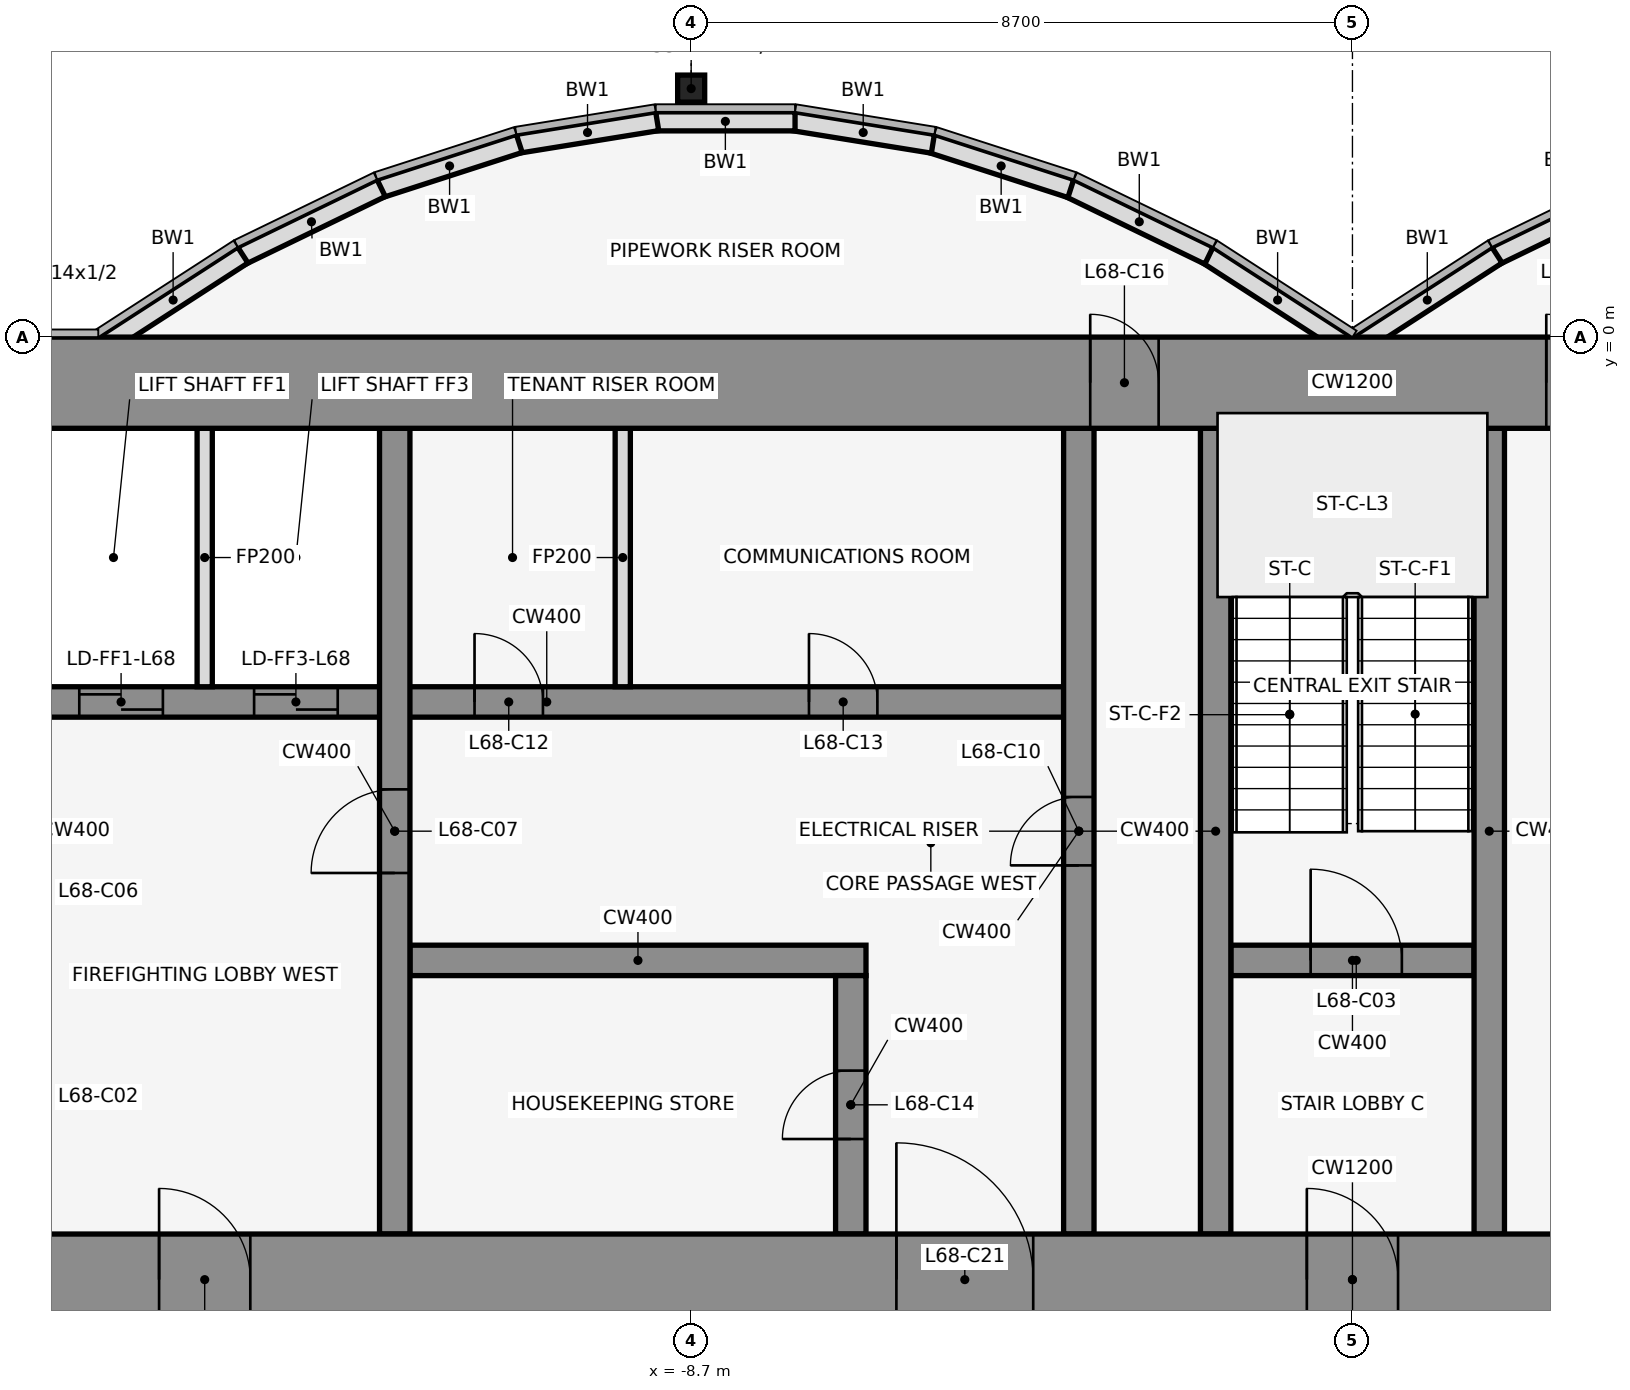
"""IFC4 building model, lengths in metres.
Left out: names, types, materials, properties, quantities, classifications, styles, units other than length and angle.
Written with IfcOpenShell. Run it as: python <this file> out.ifc"""

import sys

from ifc_helpers import new_model, si_unit, direction, frame, frame_2d, origin, origin_2d, place, context, subcontext, project, spatial, rectangle, hollow_rectangle, extrude, element, fill, save


model = new_model("IFC4")
c1 = context("Model", 3, precision=1e-05, world=origin(), true_north=direction((0.0, 1.0)))
c2 = subcontext(c1, "Body", "Model", "MODEL_VIEW")
j1 = project(units=[si_unit("LENGTHUNIT", "METRE"), si_unit("PLANEANGLEUNIT", "RADIAN")], contexts=[c1])
p1 = place(None, origin())
s1 = spatial("IfcSite", under=j1, at=p1, CompositionType="ELEMENT")
p2 = place(p1, origin())
s2 = spatial("IfcBuilding", under=s1, at=p2, CompositionType="ELEMENT")
p3 = place(p2, frame((0.0, 0.0, 302.0)))
s3 = spatial("IfcBuildingStorey", under=s2, at=p3, CompositionType="ELEMENT", Elevation=302.0)
p4 = place(p3, frame((-8.7, 3.269, 0.0), z_axis=(0.0, 0.0, 1.0), x_axis=(1.0, 0.0, 0.0)))
e1 = element("IfcColumn", 1, at=p4, inside=s3, PredefinedType="COLUMN", context=c2, shape_type="SweptSolid", body=[
    extrude(hollow_rectangle(XDim=0.356, YDim=0.356, WallThickness=0.012, at=origin_2d()), origin(), (0.0, 0.0, 1.0), 4.5),
])
p5 = place(p3, frame((3.721, 1.962, 0.0), z_axis=(0.0, 0.0, 1.0), x_axis=(-0.89982408427, -0.436252928206, 0.0)))
e2 = element("IfcWall", 2, at=p5, inside=s3, PredefinedType="STANDARD", context=c2, shape_type="SweptSolid", body=[
    extrude(rectangle(XDim=2.038, YDim=0.25, at=frame_2d((1.019, 0.0))), origin(), (0.0, 0.0, 1.0), 4.35),
])
for number, where, z_axis, x_axis in (
    (3, (1.901, 1.08, 0.0), (0.0, 0.0, 1.0), (-0.84, -0.543, 0.0)),
    (4, (-0.068, -0.105, 0.0), (0.0, 0.0, 1.0), (-0.84, 0.543, 0.0)),
):
    element("IfcWall", number, at=place(p3, frame(where, z_axis=z_axis, x_axis=x_axis)), inside=s3, PredefinedType="STANDARD", context=c2, shape_type="SweptSolid", body=[
        extrude(rectangle(XDim=2.183, YDim=0.25, at=frame_2d((1.091, 0.0))), origin(), (0.0, 0.0, 1.0), 4.35),
    ])
p6 = place(p3, frame((-1.888, 1.073, 0.0), z_axis=(0.0, 0.0, 1.0), x_axis=(-0.89982408427, 0.436252928206, 0.0)))
e5 = element("IfcWall", 5, at=p6, inside=s3, PredefinedType="STANDARD", context=c2, shape_type="SweptSolid", body=[
    extrude(rectangle(XDim=2.038, YDim=0.25, at=frame_2d((1.019, 0.0))), origin(), (0.0, 0.0, 1.0), 4.35),
])
p7 = place(p3, frame((-3.705, 1.955, 0.0), z_axis=(0.0, 0.0, 1.0), x_axis=(-0.951495806175, 0.307661714928, 0.0)))
e6 = element("IfcWall", 6, at=p7, inside=s3, PredefinedType="STANDARD", context=c2, shape_type="SweptSolid", body=[
    extrude(rectangle(XDim=1.927, YDim=0.25, at=frame_2d((0.963, 0.0))), origin(), (0.0, 0.0, 1.0), 4.35),
])
p8 = place(p3, frame((-5.52, 2.543, 0.0), z_axis=(0.0, 0.0, 1.0), x_axis=(-0.987181718931, 0.159600293885, 0.0)))
e7 = element("IfcWall", 7, at=p8, inside=s3, PredefinedType="STANDARD", context=c2, shape_type="SweptSolid", body=[
    extrude(rectangle(XDim=1.857, YDim=0.25, at=frame_2d((0.929, 0.0))), origin(), (0.0, 0.0, 1.0), 4.35),
])
p9 = place(p3, frame((-7.333, 2.838, 0.0), z_axis=(0.0, 0.0, 1.0), x_axis=(-1.0, 0.0, 0.0)))
e8 = element("IfcWall", 8, at=p9, inside=s3, PredefinedType="STANDARD", context=c2, shape_type="SweptSolid", body=[
    extrude(rectangle(XDim=1.833, YDim=0.25, at=frame_2d((0.917, 0.0))), origin(), (0.0, 0.0, 1.0), 4.35),
])
p10 = place(p3, frame((-9.147, 2.84, 0.0), z_axis=(0.0, 0.0, 1.0), x_axis=(-0.987181718931, -0.159600293885, 0.0)))
e9 = element("IfcWall", 9, at=p10, inside=s3, PredefinedType="STANDARD", context=c2, shape_type="SweptSolid", body=[
    extrude(rectangle(XDim=1.857, YDim=0.25, at=frame_2d((0.929, 0.0))), origin(), (0.0, 0.0, 1.0), 4.35),
])
p11 = place(p3, frame((-10.962, 2.548, 0.0), z_axis=(0.0, 0.0, 1.0), x_axis=(-0.951495806175, -0.307661714928, 0.0)))
e10 = element("IfcWall", 10, at=p11, inside=s3, PredefinedType="STANDARD", context=c2, shape_type="SweptSolid", body=[
    extrude(rectangle(XDim=1.927, YDim=0.25, at=frame_2d((0.963, 0.0))), origin(), (0.0, 0.0, 1.0), 4.35),
])
p12 = place(p3, frame((-12.779, 1.962, 0.0), z_axis=(0.0, 0.0, 1.0), x_axis=(-0.89982408427, -0.436252928206, 0.0)))
e11 = element("IfcWall", 11, at=p12, inside=s3, PredefinedType="STANDARD", context=c2, shape_type="SweptSolid", body=[
    extrude(rectangle(XDim=2.038, YDim=0.25, at=frame_2d((1.019, 0.0))), origin(), (0.0, 0.0, 1.0), 4.35),
])
p13 = place(p3, frame((-14.599, 1.08, 0.0), z_axis=(0.0, 0.0, 1.0), x_axis=(-0.83981312244, -0.542875602121, 0.0)))
e12 = element("IfcWall", 12, at=p13, inside=s3, PredefinedType="STANDARD", context=c2, shape_type="SweptSolid", body=[
    extrude(rectangle(XDim=2.183, YDim=0.25, at=frame_2d((1.091, 0.0))), origin(), (0.0, 0.0, 1.0), 4.35),
])
p14 = place(p3, frame((-12.4, -8.2, 0.0), z_axis=(0.0, 0.0, 1.0), x_axis=(1.0, 0.0, 0.0)))
e13 = element("IfcWall", 13, at=p14, inside=s3, PredefinedType="SHEAR", context=c2, shape_type="SweptSolid", body=[
    extrude(rectangle(XDim=6.0, YDim=0.4, at=frame_2d((3.0, 0.0))), origin(), (0.0, 0.0, 1.0), 4.5),
])
p15 = place(p3, frame((-1.6, -8.2, 0.0), z_axis=(0.0, 0.0, 1.0), x_axis=(1.0, 0.0, 0.0)))
e14 = element("IfcWall", 14, at=p15, inside=s3, PredefinedType="SHEAR", context=c2, shape_type="SweptSolid", body=[
    extrude(rectangle(XDim=3.2, YDim=0.4, at=frame_2d((1.6, 0.0))), origin(), (0.0, 0.0, 1.0), 4.5),
])
p16 = place(p15, frame((1.05, 0.0, 0.0)))
e15 = element("IfcOpeningElement", 15, at=p16, cuts=e14, PredefinedType="OPENING", context=c2, shape_type="SweptSolid", body=[
    extrude(rectangle(XDim=1.2, YDim=2.1, at=frame_2d((0.6, 1.05))), frame((0.0, 0.212, 0.0), z_axis=(0.0, -1.0, 0.0), x_axis=(1.0, 0.0, 0.0)), (0.0, 0.0, 1.0), 0.424),
])
p17 = place(p3, frame((-17.4, -4.8, 0.0), z_axis=(0.0, 0.0, 1.0), x_axis=(1.0, 0.0, 0.0)))
e16 = element("IfcWall", 16, at=p17, inside=s3, PredefinedType="SHEAR", context=c2, shape_type="SweptSolid", body=[
    extrude(rectangle(XDim=13.6, YDim=0.4, at=frame_2d((6.8, 0.0))), origin(), (0.0, 0.0, 1.0), 4.5),
])
p18 = place(p17, frame((0.65, 0.0, 0.0)))
e17 = element("IfcOpeningElement", 17, at=p18, cuts=e16, PredefinedType="OPENING", context=c2, shape_type="SweptSolid", body=[
    extrude(rectangle(XDim=1.1, YDim=2.1, at=frame_2d((0.55, 1.05))), frame((0.0, 0.212, 0.0), z_axis=(0.0, -1.0, 0.0), x_axis=(1.0, 0.0, 0.0)), (0.0, 0.0, 1.0), 0.424),
])
p19 = place(p17, frame((2.95, 0.0, 0.0)))
e18 = element("IfcOpeningElement", 18, at=p19, cuts=e16, PredefinedType="OPENING", context=c2, shape_type="SweptSolid", body=[
    extrude(rectangle(XDim=1.1, YDim=2.1, at=frame_2d((0.55, 1.05))), frame((0.0, 0.212, 0.0), z_axis=(0.0, -1.0, 0.0), x_axis=(1.0, 0.0, 0.0)), (0.0, 0.0, 1.0), 0.424),
])
p20 = place(p17, frame((5.85, 0.0, 0.0)))
e19 = element("IfcOpeningElement", 19, at=p20, cuts=e16, PredefinedType="OPENING", context=c2, shape_type="SweptSolid", body=[
    extrude(rectangle(XDim=0.9, YDim=2.1, at=frame_2d((0.45, 1.05))), frame((0.0, 0.212, 0.0), z_axis=(0.0, -1.0, 0.0), x_axis=(1.0, 0.0, 0.0)), (0.0, 0.0, 1.0), 0.424),
])
p21 = place(p17, frame((10.25, 0.0, 0.0)))
e20 = element("IfcOpeningElement", 20, at=p21, cuts=e16, PredefinedType="OPENING", context=c2, shape_type="SweptSolid", body=[
    extrude(rectangle(XDim=0.9, YDim=2.1, at=frame_2d((0.45, 1.05))), frame((0.0, 0.212, 0.0), z_axis=(0.0, -1.0, 0.0), x_axis=(1.0, 0.0, 0.0)), (0.0, 0.0, 1.0), 0.424),
])
p22 = place(p3, frame((-15.1, -4.6, 0.0), z_axis=(0.0, 0.0, 1.0), x_axis=(0.0, 1.0, 0.0)))
e21 = element("IfcWall", 21, at=p22, inside=s3, PredefinedType="PARTITIONING", context=c2, shape_type="SweptSolid", body=[
    extrude(rectangle(XDim=3.4, YDim=0.2, at=frame_2d((1.7, 0.0))), origin(), (0.0, 0.0, 1.0), 3.418),
])
p23 = place(p3, frame((-12.6, -11.8, 0.0), z_axis=(0.0, 0.0, 1.0), x_axis=(0.0, 1.0, 0.0)))
e22 = element("IfcWall", 22, at=p23, inside=s3, PredefinedType="SHEAR", context=c2, shape_type="SweptSolid", body=[
    extrude(rectangle(XDim=10.6, YDim=0.4, at=frame_2d((5.3, 0.0))), origin(), (0.0, 0.0, 1.0), 4.5),
])
p24 = place(p23, frame((4.75, 0.0, 0.0)))
e23 = element("IfcOpeningElement", 23, at=p24, cuts=e22, PredefinedType="OPENING", context=c2, shape_type="SweptSolid", body=[
    extrude(rectangle(XDim=1.1, YDim=2.1, at=frame_2d((0.55, 1.05))), frame((0.0, 0.212, 0.0), z_axis=(0.0, -1.0, 0.0), x_axis=(1.0, 0.0, 0.0)), (0.0, 0.0, 1.0), 0.424),
])
p25 = place(p3, frame((-9.6, -4.6, 0.0), z_axis=(0.0, 0.0, 1.0), x_axis=(0.0, 1.0, 0.0)))
e24 = element("IfcWall", 24, at=p25, inside=s3, PredefinedType="PARTITIONING", context=c2, shape_type="SweptSolid", body=[
    extrude(rectangle(XDim=3.4, YDim=0.2, at=frame_2d((1.7, 0.0))), origin(), (0.0, 0.0, 1.0), 3.418),
])
p26 = place(p3, frame((-6.6, -11.8, 0.0), z_axis=(0.0, 0.0, 1.0), x_axis=(0.0, 1.0, 0.0)))
e25 = element("IfcWall", 25, at=p26, inside=s3, PredefinedType="SHEAR", context=c2, shape_type="SweptSolid", body=[
    extrude(rectangle(XDim=3.4, YDim=0.4, at=frame_2d((1.7, 0.0))), origin(), (0.0, 0.0, 1.0), 4.5),
])
p27 = place(p26, frame((1.25, 0.0, 0.0)))
e26 = element("IfcOpeningElement", 26, at=p27, cuts=e25, PredefinedType="OPENING", context=c2, shape_type="SweptSolid", body=[
    extrude(rectangle(XDim=0.9, YDim=2.1, at=frame_2d((0.45, 1.05))), frame((0.0, 0.212, 0.0), z_axis=(0.0, -1.0, 0.0), x_axis=(1.0, 0.0, 0.0)), (0.0, 0.0, 1.0), 0.424),
])
p28 = place(p3, frame((-3.6, -11.8, 0.0), z_axis=(0.0, 0.0, 1.0), x_axis=(0.0, 1.0, 0.0)))
e27 = element("IfcWall", 27, at=p28, inside=s3, PredefinedType="SHEAR", context=c2, shape_type="SweptSolid", body=[
    extrude(rectangle(XDim=10.6, YDim=0.4, at=frame_2d((5.3, 0.0))), origin(), (0.0, 0.0, 1.0), 4.5),
])
p29 = place(p28, frame((4.85, 0.0, 0.0)))
e28 = element("IfcOpeningElement", 28, at=p29, cuts=e27, PredefinedType="OPENING", context=c2, shape_type="SweptSolid", body=[
    extrude(rectangle(XDim=0.9, YDim=2.1, at=frame_2d((0.45, 1.05))), frame((0.0, 0.212, 0.0), z_axis=(0.0, -1.0, 0.0), x_axis=(1.0, 0.0, 0.0)), (0.0, 0.0, 1.0), 0.424),
])
for number, where, z_axis, x_axis in (
    (29, (-1.8, -11.8, 0.0), (0.0, 0.0, 1.0), (0.0, 1.0, 0.0)),
    (30, (1.8, -11.8, 0.0), (0.0, 0.0, 1.0), (0.0, 1.0, 0.0)),
):
    element("IfcWall", number, at=place(p3, frame(where, z_axis=z_axis, x_axis=x_axis)), inside=s3, PredefinedType="SHEAR", context=c2, shape_type="SweptSolid", body=[
        extrude(rectangle(XDim=10.6, YDim=0.4, at=frame_2d((5.3, 0.0))), origin(), (0.0, 0.0, 1.0), 4.5),
    ])
p30 = place(p3, frame((-22.0, -0.6, 0.0), z_axis=(0.0, 0.0, 1.0), x_axis=(1.0, 0.0, 0.0)))
e31 = element("IfcWall", 31, at=p30, inside=s3, PredefinedType="SHEAR", context=c2, shape_type="SweptSolid", body=[
    extrude(rectangle(XDim=44.0, YDim=1.2, at=frame_2d((22.0, 0.0))), origin(), (0.0, 0.0, 1.0), 4.5),
])
p31 = place(p30, frame((18.55, 0.0, 0.0)))
e32 = element("IfcOpeningElement", 32, at=p31, cuts=e31, PredefinedType="OPENING", context=c2, shape_type="SweptSolid", body=[
    extrude(rectangle(XDim=0.9, YDim=2.1, at=frame_2d((0.45, 1.05))), frame((0.0, 0.612, 0.0), z_axis=(0.0, -1.0, 0.0), x_axis=(1.0, 0.0, 0.0)), (0.0, 0.0, 1.0), 1.224),
])
p32 = place(p30, frame((24.55, 0.0, 0.0)))
e33 = element("IfcOpeningElement", 33, at=p32, cuts=e31, PredefinedType="OPENING", context=c2, shape_type="SweptSolid", body=[
    extrude(rectangle(XDim=0.9, YDim=2.1, at=frame_2d((0.45, 1.05))), frame((0.0, 0.612, 0.0), z_axis=(0.0, -1.0, 0.0), x_axis=(1.0, 0.0, 0.0)), (0.0, 0.0, 1.0), 1.224),
])
p33 = place(p3, frame((-22.0, -12.4, 0.0), z_axis=(0.0, 0.0, 1.0), x_axis=(1.0, 0.0, 0.0)))
e34 = element("IfcWall", 34, at=p33, inside=s3, PredefinedType="SHEAR", context=c2, shape_type="SweptSolid", body=[
    extrude(rectangle(XDim=44.0, YDim=1.2, at=frame_2d((22.0, 0.0))), origin(), (0.0, 0.0, 1.0), 4.5),
])
p34 = place(p33, frame((2.2, 0.0, 0.0)))
e35 = element("IfcOpeningElement", 35, at=p34, cuts=e34, PredefinedType="OPENING", context=c2, shape_type="SweptSolid", body=[
    extrude(rectangle(XDim=1.2, YDim=2.1, at=frame_2d((0.6, 1.05))), frame((0.0, 0.612, 0.0), z_axis=(0.0, -1.0, 0.0), x_axis=(1.0, 0.0, 0.0)), (0.0, 0.0, 1.0), 1.224),
])
p35 = place(p33, frame((21.4, 0.0, 0.0)))
e36 = element("IfcOpeningElement", 36, at=p35, cuts=e34, PredefinedType="OPENING", context=c2, shape_type="SweptSolid", body=[
    extrude(rectangle(XDim=1.2, YDim=2.1, at=frame_2d((0.6, 1.05))), frame((0.0, 0.612, 0.0), z_axis=(0.0, -1.0, 0.0), x_axis=(1.0, 0.0, 0.0)), (0.0, 0.0, 1.0), 1.224),
])
p36 = place(p33, frame((40.6, 0.0, 0.0)))
e37 = element("IfcOpeningElement", 37, at=p36, cuts=e34, PredefinedType="OPENING", context=c2, shape_type="SweptSolid", body=[
    extrude(rectangle(XDim=1.2, YDim=2.1, at=frame_2d((0.6, 1.05))), frame((0.0, 0.612, 0.0), z_axis=(0.0, -1.0, 0.0), x_axis=(1.0, 0.0, 0.0)), (0.0, 0.0, 1.0), 1.224),
])
p37 = place(p33, frame((16.0, 0.0, 0.0)))
e38 = element("IfcOpeningElement", 38, at=p37, cuts=e34, PredefinedType="OPENING", context=c2, shape_type="SweptSolid", body=[
    extrude(rectangle(XDim=1.8, YDim=2.1, at=frame_2d((0.9, 1.05))), frame((0.0, 0.612, 0.0), z_axis=(0.0, -1.0, 0.0), x_axis=(1.0, 0.0, 0.0)), (0.0, 0.0, 1.0), 1.224),
])
p38 = place(p33, frame((6.3, 0.0, 0.0)))
e39 = element("IfcOpeningElement", 39, at=p38, cuts=e34, PredefinedType="OPENING", context=c2, shape_type="SweptSolid", body=[
    extrude(rectangle(XDim=1.2, YDim=2.1, at=frame_2d((0.6, 1.05))), frame((0.0, 0.612, 0.0), z_axis=(0.0, -1.0, 0.0), x_axis=(1.0, 0.0, 0.0)), (0.0, 0.0, 1.0), 1.224),
])
p39 = place(p33, frame((26.2, 0.0, 0.0)))
e40 = element("IfcOpeningElement", 40, at=p39, cuts=e34, PredefinedType="OPENING", context=c2, shape_type="SweptSolid", body=[
    extrude(rectangle(XDim=1.8, YDim=2.1, at=frame_2d((0.9, 1.05))), frame((0.0, 0.612, 0.0), z_axis=(0.0, -1.0, 0.0), x_axis=(1.0, 0.0, 0.0)), (0.0, 0.0, 1.0), 1.224),
])
p40 = place(p33, frame((36.5, 0.0, 0.0)))
e41 = element("IfcOpeningElement", 41, at=p40, cuts=e34, PredefinedType="OPENING", context=c2, shape_type="SweptSolid", body=[
    extrude(rectangle(XDim=1.2, YDim=2.1, at=frame_2d((0.6, 1.05))), frame((0.0, 0.612, 0.0), z_axis=(0.0, -1.0, 0.0), x_axis=(1.0, 0.0, 0.0)), (0.0, 0.0, 1.0), 1.224),
])
p41 = place(p16, origin())
e42 = element("IfcDoor", 42, at=p41, inside=s3, OperationType="SINGLE_SWING_LEFT", PredefinedType="DOOR", context=c2, shape_type="SweptSolid", body=[
    extrude(rectangle(XDim=1.2, YDim=2.1, at=frame_2d((0.6, 1.05))), frame((0.0, 0.025, 0.0), z_axis=(0.0, -1.0, 0.0), x_axis=(1.0, 0.0, 0.0)), (0.0, 0.0, 1.0), 0.05),
])
fill(e15, e42)
p42 = place(p18, origin())
e43 = element("IfcDoor", 43, at=p42, inside=s3, OperationType="DOUBLE_DOOR_SLIDING", PredefinedType="DOOR", context=c2, shape_type="SweptSolid", body=[
    extrude(rectangle(XDim=1.1, YDim=2.1, at=frame_2d((0.55, 1.05))), frame((0.0, 0.025, 0.0), z_axis=(0.0, -1.0, 0.0), x_axis=(1.0, 0.0, 0.0)), (0.0, 0.0, 1.0), 0.05),
])
fill(e17, e43)
p43 = place(p19, origin())
e44 = element("IfcDoor", 44, at=p43, inside=s3, OperationType="DOUBLE_DOOR_SLIDING", PredefinedType="DOOR", context=c2, shape_type="SweptSolid", body=[
    extrude(rectangle(XDim=1.1, YDim=2.1, at=frame_2d((0.55, 1.05))), frame((0.0, 0.025, 0.0), z_axis=(0.0, -1.0, 0.0), x_axis=(1.0, 0.0, 0.0)), (0.0, 0.0, 1.0), 0.05),
])
fill(e18, e44)
p44 = place(p24, origin())
e45 = element("IfcDoor", 45, at=p44, inside=s3, OperationType="SINGLE_SWING_LEFT", PredefinedType="DOOR", context=c2, shape_type="SweptSolid", body=[
    extrude(rectangle(XDim=1.1, YDim=2.1, at=frame_2d((0.55, 1.05))), frame((0.0, 0.025, 0.0), z_axis=(0.0, -1.0, 0.0), x_axis=(1.0, 0.0, 0.0)), (0.0, 0.0, 1.0), 0.05),
])
fill(e23, e45)
p45 = place(p29, frame((0.9, 0.0, 0.0), z_axis=(0.0, 0.0, 1.0), x_axis=(-1.0, 0.0, 0.0)))
e46 = element("IfcDoor", 46, at=p45, inside=s3, OperationType="SINGLE_SWING_LEFT", PredefinedType="DOOR", context=c2, shape_type="SweptSolid", body=[
    extrude(rectangle(XDim=0.9, YDim=2.1, at=frame_2d((0.45, 1.05))), frame((0.0, 0.025, 0.0), z_axis=(0.0, -1.0, 0.0), x_axis=(1.0, 0.0, 0.0)), (0.0, 0.0, 1.0), 0.05),
])
fill(e28, e46)
p46 = place(p20, origin())
e47 = element("IfcDoor", 47, at=p46, inside=s3, OperationType="SINGLE_SWING_RIGHT", PredefinedType="DOOR", context=c2, shape_type="SweptSolid", body=[
    extrude(rectangle(XDim=0.9, YDim=2.1, at=frame_2d((0.45, 1.05))), frame((0.0, 0.025, 0.0), z_axis=(0.0, -1.0, 0.0), x_axis=(1.0, 0.0, 0.0)), (0.0, 0.0, 1.0), 0.05),
])
fill(e19, e47)
p47 = place(p21, origin())
e48 = element("IfcDoor", 48, at=p47, inside=s3, OperationType="SINGLE_SWING_LEFT", PredefinedType="DOOR", context=c2, shape_type="SweptSolid", body=[
    extrude(rectangle(XDim=0.9, YDim=2.1, at=frame_2d((0.45, 1.05))), frame((0.0, 0.025, 0.0), z_axis=(0.0, -1.0, 0.0), x_axis=(1.0, 0.0, 0.0)), (0.0, 0.0, 1.0), 0.05),
])
fill(e20, e48)
p48 = place(p27, origin())
e49 = element("IfcDoor", 49, at=p48, inside=s3, OperationType="SINGLE_SWING_RIGHT", PredefinedType="DOOR", context=c2, shape_type="SweptSolid", body=[
    extrude(rectangle(XDim=0.9, YDim=2.1, at=frame_2d((0.45, 1.05))), frame((0.0, 0.025, 0.0), z_axis=(0.0, -1.0, 0.0), x_axis=(1.0, 0.0, 0.0)), (0.0, 0.0, 1.0), 0.05),
])
fill(e26, e49)
p49 = place(p31, origin())
e50 = element("IfcDoor", 50, at=p49, inside=s3, OperationType="SINGLE_SWING_LEFT", PredefinedType="DOOR", context=c2, shape_type="SweptSolid", body=[
    extrude(rectangle(XDim=0.9, YDim=2.1, at=frame_2d((0.45, 1.05))), frame((0.0, 0.025, 0.0), z_axis=(0.0, -1.0, 0.0), x_axis=(1.0, 0.0, 0.0)), (0.0, 0.0, 1.0), 0.05),
])
fill(e32, e50)
p50 = place(p32, origin())
e51 = element("IfcDoor", 51, at=p50, inside=s3, OperationType="SINGLE_SWING_LEFT", PredefinedType="DOOR", context=c2, shape_type="SweptSolid", body=[
    extrude(rectangle(XDim=0.9, YDim=2.1, at=frame_2d((0.45, 1.05))), frame((0.0, 0.025, 0.0), z_axis=(0.0, -1.0, 0.0), x_axis=(1.0, 0.0, 0.0)), (0.0, 0.0, 1.0), 0.05),
])
fill(e33, e51)
p51 = place(p35, frame((1.2, 0.0, 0.0), z_axis=(0.0, 0.0, 1.0), x_axis=(-1.0, 0.0, 0.0)))
e52 = element("IfcDoor", 52, at=p51, inside=s3, OperationType="SINGLE_SWING_RIGHT", PredefinedType="DOOR", context=c2, shape_type="SweptSolid", body=[
    extrude(rectangle(XDim=1.2, YDim=2.1, at=frame_2d((0.6, 1.05))), frame((0.0, 0.025, 0.0), z_axis=(0.0, -1.0, 0.0), x_axis=(1.0, 0.0, 0.0)), (0.0, 0.0, 1.0), 0.05),
])
fill(e36, e52)
p52 = place(p37, origin())
e53 = element("IfcDoor", 53, at=p52, inside=s3, OperationType="SINGLE_SWING_LEFT", PredefinedType="DOOR", context=c2, shape_type="SweptSolid", body=[
    extrude(rectangle(XDim=1.8, YDim=2.1, at=frame_2d((0.9, 1.05))), frame((0.0, 0.025, 0.0), z_axis=(0.0, -1.0, 0.0), x_axis=(1.0, 0.0, 0.0)), (0.0, 0.0, 1.0), 0.05),
])
fill(e38, e53)
p53 = place(p38, frame((1.2, 0.0, 0.0), z_axis=(0.0, 0.0, 1.0), x_axis=(-1.0, 0.0, 0.0)))
e54 = element("IfcDoor", 54, at=p53, inside=s3, OperationType="SINGLE_SWING_RIGHT", PredefinedType="DOOR", context=c2, shape_type="SweptSolid", body=[
    extrude(rectangle(XDim=1.2, YDim=2.1, at=frame_2d((0.6, 1.05))), frame((0.0, 0.025, 0.0), z_axis=(0.0, -1.0, 0.0), x_axis=(1.0, 0.0, 0.0)), (0.0, 0.0, 1.0), 0.05),
])
fill(e39, e54)
save(model, sys.argv[1])
